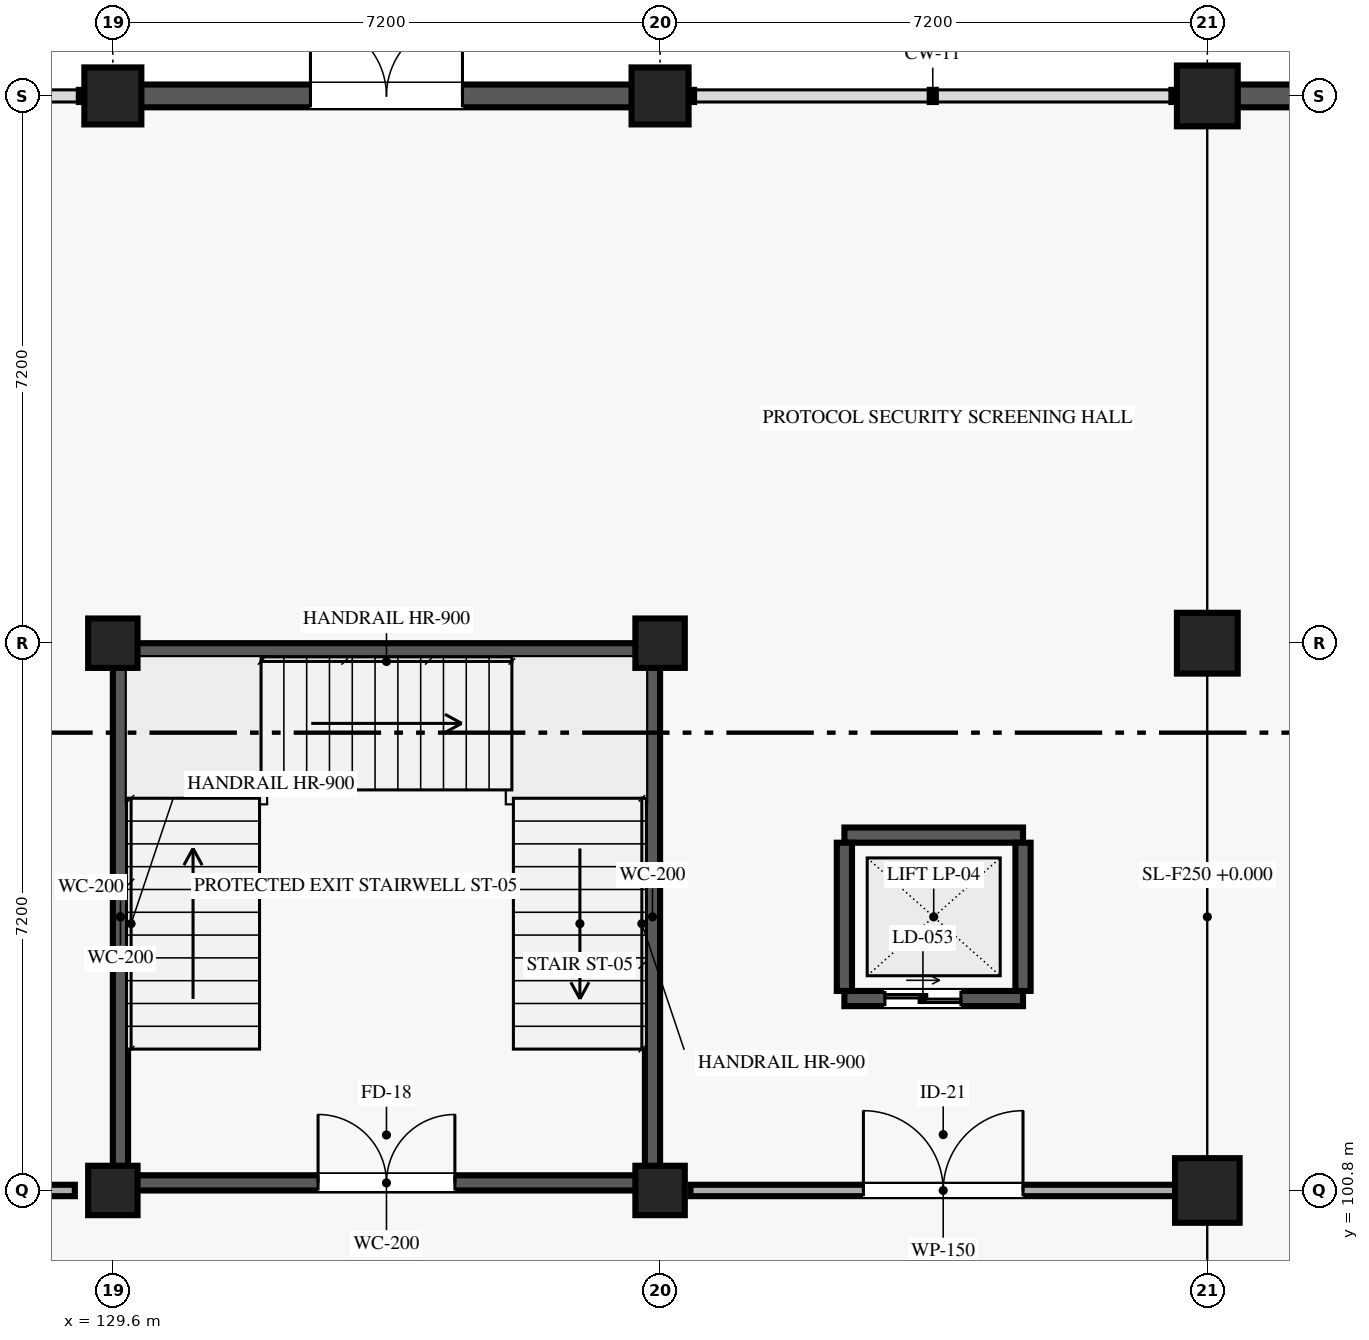
"""IFC4 building model, lengths in metres.
Left out: names, types, materials, properties, quantities, classifications, styles, units other than length and angle.
Written with IfcOpenShell. Run it as: python <this file> out.ifc"""

import sys

from ifc_helpers import new_model, si_unit, direction, frame, frame_2d, origin, origin_2d, place, context, subcontext, project, spatial, rectangle, extrude, element, fill, save


model = new_model("IFC4")
c1 = context("Model", 3, precision=1e-05, world=origin(), true_north=direction((0.0, 1.0)))
c2 = subcontext(c1, "Body", "Model", "MODEL_VIEW")
j1 = project(units=[si_unit("LENGTHUNIT", "METRE"), si_unit("PLANEANGLEUNIT", "RADIAN")], contexts=[c1])
p1 = place(None, origin())
s1 = spatial("IfcSite", under=j1, at=p1, CompositionType="ELEMENT")
p2 = place(p1, origin())
s2 = spatial("IfcBuilding", under=s1, at=p2, CompositionType="ELEMENT")
p3 = place(p2, origin())
s3 = spatial("IfcBuildingStorey", under=s2, at=p3, CompositionType="ELEMENT", Elevation=0.0)
for number, where, z_axis, x_axis in (
    (1, (129.6, 100.8, 0.0), (0.0, 0.0, 1.0), (1.0, 0.0, 0.0)),
    (2, (129.6, 108.0, 0.0), (0.0, 0.0, 1.0), (1.0, 0.0, 0.0)),
):
    element("IfcColumn", number, at=place(p3, frame(where, z_axis=z_axis, x_axis=x_axis)), inside=s3, PredefinedType="COLUMN", context=c2, shape_type="SweptSolid", body=[
        extrude(rectangle(XDim=0.65, YDim=0.65, at=origin_2d()), origin(), (0.0, 0.0, 1.0), 5.4),
    ])
p4 = place(p3, frame((129.6, 115.2, 0.0), z_axis=(0.0, 0.0, 1.0), x_axis=(1.0, 0.0, 0.0)))
e3 = element("IfcColumn", 3, at=p4, inside=s3, PredefinedType="COLUMN", context=c2, shape_type="SweptSolid", body=[
    extrude(rectangle(XDim=0.75, YDim=0.75, at=origin_2d()), origin(), (0.0, 0.0, 1.0), 5.4),
])
for number, where, z_axis, x_axis in (
    (4, (136.8, 100.8, 0.0), (0.0, 0.0, 1.0), (1.0, 0.0, 0.0)),
    (5, (136.8, 108.0, 0.0), (0.0, 0.0, 1.0), (1.0, 0.0, 0.0)),
):
    element("IfcColumn", number, at=place(p3, frame(where, z_axis=z_axis, x_axis=x_axis)), inside=s3, PredefinedType="COLUMN", context=c2, shape_type="SweptSolid", body=[
        extrude(rectangle(XDim=0.65, YDim=0.65, at=origin_2d()), origin(), (0.0, 0.0, 1.0), 5.4),
    ])
p5 = place(p3, frame((136.8, 115.2, 0.0), z_axis=(0.0, 0.0, 1.0), x_axis=(1.0, 0.0, 0.0)))
e6 = element("IfcColumn", 6, at=p5, inside=s3, PredefinedType="COLUMN", context=c2, shape_type="SweptSolid", body=[
    extrude(rectangle(XDim=0.75, YDim=0.75, at=origin_2d()), origin(), (0.0, 0.0, 1.0), 5.4),
])
p6 = place(p3, frame((144.0, 100.8, 0.0), z_axis=(0.0, 0.0, 1.0), x_axis=(1.0, 0.0, 0.0)))
e7 = element("IfcColumn", 7, at=p6, inside=s3, PredefinedType="COLUMN", context=c2, shape_type="SweptSolid", body=[
    extrude(rectangle(XDim=0.85, YDim=0.85, at=origin_2d()), origin(), (0.0, 0.0, 1.0), 5.4),
])
for number, where, z_axis, x_axis in (
    (8, (144.0, 108.0, 0.0), (0.0, 0.0, 1.0), (1.0, 0.0, 0.0)),
    (9, (144.0, 115.2, 0.0), (0.0, 0.0, 1.0), (1.0, 0.0, 0.0)),
):
    element("IfcColumn", number, at=place(p3, frame(where, z_axis=z_axis, x_axis=x_axis)), inside=s3, PredefinedType="COLUMN", context=c2, shape_type="SweptSolid", body=[
        extrude(rectangle(XDim=0.8, YDim=0.8, at=origin_2d()), origin(), (0.0, 0.0, 1.0), 5.4),
    ])
p7 = place(p3, frame((129.97, 115.2, 0.0), z_axis=(0.0, 0.0, 1.0), x_axis=(1.0, 0.0, 0.0)))
e10 = element("IfcWall", 10, at=p7, inside=s3, PredefinedType="SOLIDWALL", context=c2, shape_type="SweptSolid", body=[
    extrude(rectangle(XDim=6.46, YDim=0.3, at=frame_2d((3.23, 0.0))), origin(), (0.0, 0.0, 1.0), 5.16),
])
p8 = place(p7, frame((2.23, 0.0, 0.0)))
e11 = element("IfcOpeningElement", 11, at=p8, cuts=e10, PredefinedType="OPENING", context=c2, shape_type="SweptSolid", body=[
    extrude(rectangle(XDim=2.0, YDim=2.3, at=frame_2d((1.0, 1.15))), frame((0.0, 0.16, 0.0), z_axis=(0.0, -1.0, 0.0), x_axis=(1.0, 0.0, 0.0)), (0.0, 0.0, 1.0), 0.32),
])
p9 = place(p3, frame((144.395, 115.2, 0.0), z_axis=(0.0, 0.0, 1.0), x_axis=(1.0, 0.0, 0.0)))
e12 = element("IfcWall", 12, at=p9, inside=s3, PredefinedType="SOLIDWALL", context=c2, shape_type="SweptSolid", body=[
    extrude(rectangle(XDim=6.41, YDim=0.3, at=frame_2d((3.205, 0.0))), origin(), (0.0, 0.0, 1.0), 5.16),
])
p10 = place(p9, frame((2.305, 0.0, 0.0)))
e13 = element("IfcOpeningElement", 13, at=p10, cuts=e12, PredefinedType="OPENING", context=c2, shape_type="SweptSolid", body=[
    extrude(rectangle(XDim=1.8, YDim=2.2, at=frame_2d((0.9, 1.1))), frame((0.0, 0.16, 0.0), z_axis=(0.0, -1.0, 0.0), x_axis=(1.0, 0.0, 0.0)), (0.0, 0.0, 1.0), 0.32),
])
p11 = place(p3, frame((129.8, 100.9, 0.0), z_axis=(0.0, 0.0, 1.0), x_axis=(1.0, 0.0, 0.0)))
e14 = element("IfcWall", 14, at=p11, inside=s3, PredefinedType="SHEAR", context=c2, shape_type="SweptSolid", body=[
    extrude(rectangle(XDim=6.8, YDim=0.2, at=frame_2d((3.4, 0.0))), origin(), (0.0, 0.0, 1.0), 5.16),
])
p12 = place(p11, frame((2.5, 0.0, 0.0)))
e15 = element("IfcOpeningElement", 15, at=p12, cuts=e14, PredefinedType="OPENING", context=c2, shape_type="SweptSolid", body=[
    extrude(rectangle(XDim=1.8, YDim=2.2, at=frame_2d((0.9, 1.1))), frame((0.0, 0.11, 0.0), z_axis=(0.0, -1.0, 0.0), x_axis=(1.0, 0.0, 0.0)), (0.0, 0.0, 1.0), 0.22),
])
for number, where, z_axis, x_axis in (
    (16, (129.8, 107.9, 0.0), (0.0, 0.0, 1.0), (1.0, 0.0, 0.0)),
    (17, (129.7, 101.0, 0.0), (0.0, 0.0, 1.0), (0.0, 1.0, 0.0)),
    (18, (136.7, 101.0, 0.0), (0.0, 0.0, 1.0), (0.0, 1.0, 0.0)),
):
    element("IfcWall", number, at=place(p3, frame(where, z_axis=z_axis, x_axis=x_axis)), inside=s3, PredefinedType="SHEAR", context=c2, shape_type="SweptSolid", body=[
        extrude(rectangle(XDim=6.8, YDim=0.2, at=frame_2d((3.4, 0.0))), origin(), (0.0, 0.0, 1.0), 5.16),
    ])
p13 = place(p3, frame((139.225, 103.325, 0.0), z_axis=(0.0, 0.0, 1.0), x_axis=(1.0, 0.0, 0.0)))
e19 = element("IfcWall", 19, at=p13, inside=s3, PredefinedType="SHEAR", context=c2, shape_type="SweptSolid", body=[
    extrude(rectangle(XDim=2.35, YDim=0.2, at=frame_2d((1.175, 0.0))), origin(), (0.0, 0.0, 1.0), 5.16),
])
p14 = place(p13, frame((0.533, 0.0, 0.0)))
e20 = element("IfcOpeningElement", 20, at=p14, cuts=e19, PredefinedType="OPENING", context=c2, shape_type="SweptSolid", body=[
    extrude(rectangle(XDim=1.0, YDim=2.1, at=frame_2d((0.5, 1.05))), frame((0.0, 0.11, 0.0), z_axis=(0.0, -1.0, 0.0), x_axis=(1.0, 0.0, 0.0)), (0.0, 0.0, 1.0), 0.22),
])
p15 = place(p3, frame((139.225, 105.475, 0.0), z_axis=(0.0, 0.0, 1.0), x_axis=(1.0, 0.0, 0.0)))
e21 = element("IfcWall", 21, at=p15, inside=s3, PredefinedType="SHEAR", context=c2, shape_type="SweptSolid", body=[
    extrude(rectangle(XDim=2.35, YDim=0.2, at=frame_2d((1.175, 0.0))), origin(), (0.0, 0.0, 1.0), 5.16),
])
for number, where, z_axis, x_axis in (
    (22, (139.225, 103.425, 0.0), (0.0, 0.0, 1.0), (0.0, 1.0, 0.0)),
    (23, (141.575, 103.425, 0.0), (0.0, 0.0, 1.0), (0.0, 1.0, 0.0)),
):
    element("IfcWall", number, at=place(p3, frame(where, z_axis=z_axis, x_axis=x_axis)), inside=s3, PredefinedType="SHEAR", context=c2, shape_type="SweptSolid", body=[
        extrude(rectangle(XDim=1.95, YDim=0.2, at=frame_2d((0.975, 0.0))), origin(), (0.0, 0.0, 1.0), 5.16),
    ])
p16 = place(p3, frame((94.1, 100.8, 0.0), z_axis=(0.0, 0.0, 1.0), x_axis=(1.0, 0.0, 0.0)))
e24 = element("IfcWall", 24, at=p16, inside=s3, PredefinedType="PARTITIONING", context=c2, shape_type="SweptSolid", body=[
    extrude(rectangle(XDim=35.0, YDim=0.15, at=frame_2d((17.5, 0.0))), origin(), (0.0, 0.0, 1.0), 4.5),
])
p17 = place(p16, frame((2.503, 0.0, 0.0)))
e25 = element("IfcOpeningElement", 25, at=p17, cuts=e24, PredefinedType="OPENING", context=c2, shape_type="SweptSolid", body=[
    extrude(rectangle(XDim=1.2, YDim=2.15, at=frame_2d((0.6, 1.075))), frame((0.0, 0.085, 0.0), z_axis=(0.0, -1.0, 0.0), x_axis=(1.0, 0.0, 0.0)), (0.0, 0.0, 1.0), 0.17),
])
p18 = place(p3, frame((137.2, 100.8, 0.0), z_axis=(0.0, 0.0, 1.0), x_axis=(1.0, 0.0, 0.0)))
e26 = element("IfcWall", 26, at=p18, inside=s3, PredefinedType="PARTITIONING", context=c2, shape_type="SweptSolid", body=[
    extrude(rectangle(XDim=6.65, YDim=0.15, at=frame_2d((3.325, 0.0))), origin(), (0.0, 0.0, 1.0), 4.5),
])
p19 = place(p18, frame((2.275, 0.0, 0.0)))
e27 = element("IfcOpeningElement", 27, at=p19, cuts=e26, PredefinedType="OPENING", context=c2, shape_type="SweptSolid", body=[
    extrude(rectangle(XDim=2.1, YDim=2.4, at=frame_2d((1.05, 1.2))), frame((0.0, 0.085, 0.0), z_axis=(0.0, -1.0, 0.0), x_axis=(1.0, 0.0, 0.0)), (0.0, 0.0, 1.0), 0.17),
])
p20 = place(p8, origin())
e28 = element("IfcDoor", 28, at=p20, inside=s3, OperationType="DOUBLE_DOOR_SINGLE_SWING", PredefinedType="DOOR", context=c2, shape_type="SweptSolid", body=[
    extrude(rectangle(XDim=2.0, YDim=2.3, at=frame_2d((1.0, 1.15))), frame((0.0, 0.025, 0.0), z_axis=(0.0, -1.0, 0.0), x_axis=(1.0, 0.0, 0.0)), (0.0, 0.0, 1.0), 0.05),
])
fill(e11, e28)
p21 = place(p12, origin())
e29 = element("IfcDoor", 29, at=p21, inside=s3, OperationType="DOUBLE_DOOR_SINGLE_SWING", PredefinedType="DOOR", context=c2, shape_type="SweptSolid", body=[
    extrude(rectangle(XDim=1.8, YDim=2.2, at=frame_2d((0.9, 1.1))), frame((0.0, 0.025, 0.0), z_axis=(0.0, -1.0, 0.0), x_axis=(1.0, 0.0, 0.0)), (0.0, 0.0, 1.0), 0.05),
])
fill(e15, e29)
p22 = place(p14, origin())
e30 = element("IfcDoor", 30, at=p22, inside=s3, OperationType="DOUBLE_DOOR_SLIDING", PredefinedType="DOOR", context=c2, shape_type="SweptSolid", body=[
    extrude(rectangle(XDim=1.0, YDim=2.1, at=frame_2d((0.5, 1.05))), frame((0.0, 0.025, 0.0), z_axis=(0.0, -1.0, 0.0), x_axis=(1.0, 0.0, 0.0)), (0.0, 0.0, 1.0), 0.05),
])
fill(e20, e30)
p23 = place(p19, origin())
e31 = element("IfcDoor", 31, at=p23, inside=s3, OperationType="DOUBLE_DOOR_SINGLE_SWING", PredefinedType="DOOR", context=c2, shape_type="SweptSolid", body=[
    extrude(rectangle(XDim=2.1, YDim=2.4, at=frame_2d((1.05, 1.2))), frame((0.0, 0.025, 0.0), z_axis=(0.0, -1.0, 0.0), x_axis=(1.0, 0.0, 0.0)), (0.0, 0.0, 1.0), 0.05),
])
fill(e27, e31)
save(model, sys.argv[1])
